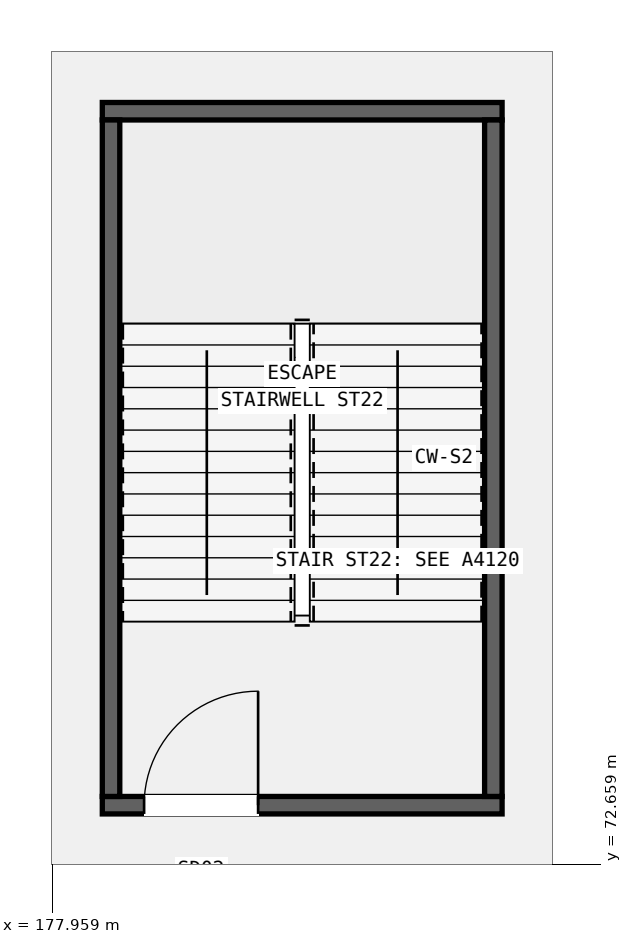
"""IFC4 building model, lengths in metres.
Left out: names, types, materials, properties, quantities, classifications, styles, units other than length and angle.
Written with IfcOpenShell. Run it as: python <this file> out.ifc"""

import sys

from ifc_helpers import new_model, si_unit, direction, frame, frame_2d, origin, place, context, subcontext, project, spatial, rectangle, extrude, element, fill, save


model = new_model("IFC4")
c1 = context("Model", 3, precision=1e-05, world=origin(), true_north=direction((0.0, 1.0)))
c2 = subcontext(c1, "Body", "Model", "MODEL_VIEW")
j1 = project(units=[si_unit("LENGTHUNIT", "METRE"), si_unit("PLANEANGLEUNIT", "RADIAN")], contexts=[c1])
p1 = place(None, origin())
s1 = spatial("IfcSite", under=j1, at=p1, CompositionType="ELEMENT")
p2 = place(p1, origin())
s2 = spatial("IfcBuilding", under=s1, at=p2, CompositionType="ELEMENT")
p3 = place(p2, frame((0.0, 0.0, 5.4)))
s3 = spatial("IfcBuildingStorey", under=s2, at=p3, CompositionType="ELEMENT", Elevation=5.4)
p4 = place(p3, frame((178.62, 73.435, 0.0), z_axis=(0.0, 0.0, 1.0), x_axis=(1.0, 0.0, 0.0)))
e1 = element("IfcWall", 1, at=p4, inside=s3, PredefinedType="SHEAR", context=c2, shape_type="SweptSolid", body=[
    extrude(rectangle(XDim=5.26, YDim=0.23, at=frame_2d((2.63, 0.0))), origin(), (0.0, 0.0, 1.0), 4.55),
])
p5 = place(p4, frame((0.55, 0.0, 0.0)))
e2 = element("IfcOpeningElement", 2, at=p5, cuts=e1, PredefinedType="OPENING", context=c2, shape_type="SweptSolid", body=[
    extrude(rectangle(XDim=1.5, YDim=2.2, at=frame_2d((0.75, 1.1))), frame((0.0, 0.125, 0.0), z_axis=(0.0, -1.0, 0.0), x_axis=(1.0, 0.0, 0.0)), (0.0, 0.0, 1.0), 0.25),
])
p6 = place(p3, frame((178.62, 82.565, 0.0), z_axis=(0.0, 0.0, 1.0), x_axis=(1.0, 0.0, 0.0)))
e3 = element("IfcWall", 3, at=p6, inside=s3, PredefinedType="SHEAR", context=c2, shape_type="SweptSolid", body=[
    extrude(rectangle(XDim=5.26, YDim=0.23, at=frame_2d((2.63, 0.0))), origin(), (0.0, 0.0, 1.0), 4.55),
])
for number, where, z_axis, x_axis in (
    (4, (178.735, 73.55, 0.0), (0.0, 0.0, 1.0), (0.0, 1.0, 0.0)),
    (5, (183.765, 73.55, 0.0), (0.0, 0.0, 1.0), (0.0, 1.0, 0.0)),
):
    element("IfcWall", number, at=place(p3, frame(where, z_axis=z_axis, x_axis=x_axis)), inside=s3, PredefinedType="SHEAR", context=c2, shape_type="SweptSolid", body=[
        extrude(rectangle(XDim=8.9, YDim=0.23, at=frame_2d((4.45, 0.0))), origin(), (0.0, 0.0, 1.0), 4.55),
    ])
p7 = place(p5, origin())
e6 = element("IfcDoor", 6, at=p7, inside=s3, OperationType="SINGLE_SWING_RIGHT", PredefinedType="DOOR", context=c2, shape_type="SweptSolid", body=[
    extrude(rectangle(XDim=1.5, YDim=2.2, at=frame_2d((0.75, 1.1))), frame((0.0, 0.025, 0.0), z_axis=(0.0, -1.0, 0.0), x_axis=(1.0, 0.0, 0.0)), (0.0, 0.0, 1.0), 0.05),
])
fill(e2, e6)
save(model, sys.argv[1])
